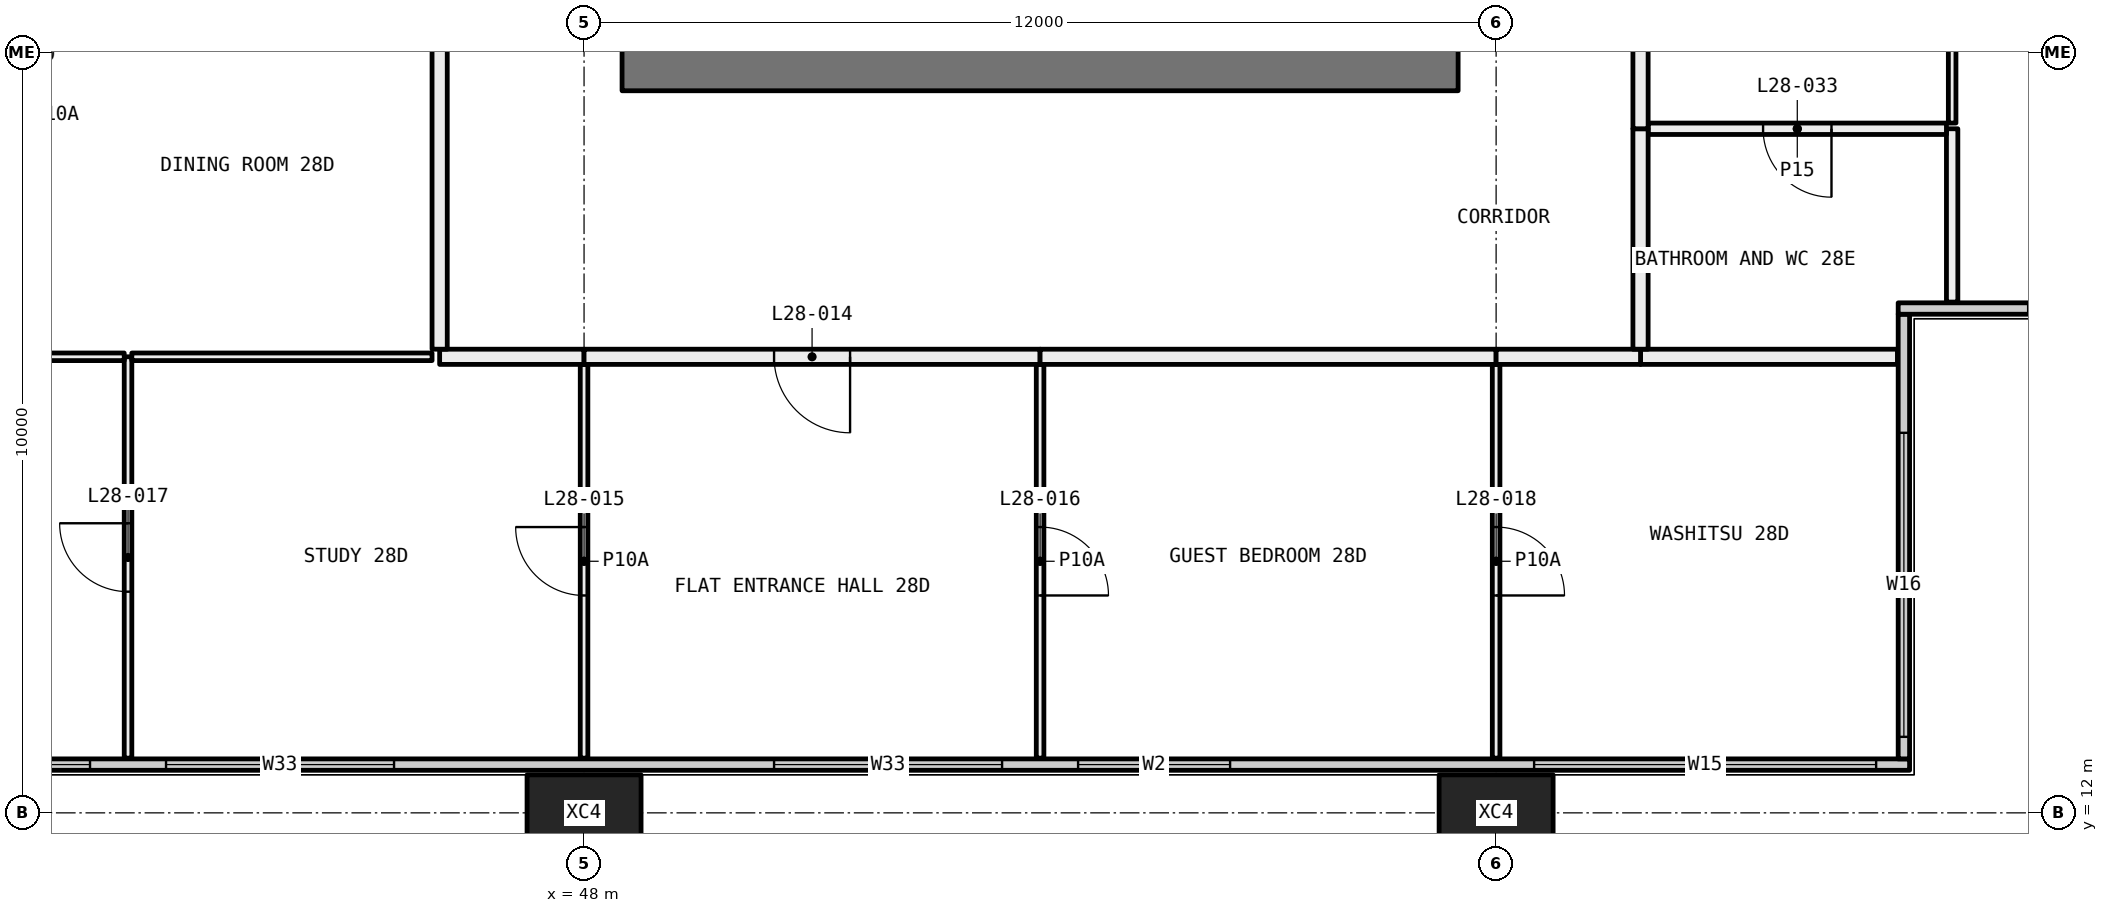
"""IFC4 building model, lengths in metres.
Left out: names, types, materials, properties, quantities, classifications, styles, units other than length and angle.
Written with IfcOpenShell. Run it as: python <this file> out.ifc"""

import sys

from ifc_helpers import new_model, si_unit, direction, frame, frame_2d, origin, origin_2d, place, context, subcontext, project, spatial, rectangle, hollow_rectangle, extrude, element, fill, save


model = new_model("IFC4")
c1 = context("Model", 3, precision=1e-05, world=origin(), true_north=direction((0.0, 1.0)))
c2 = subcontext(c1, "Body", "Model", "MODEL_VIEW")
j1 = project(units=[si_unit("LENGTHUNIT", "METRE"), si_unit("PLANEANGLEUNIT", "RADIAN")], contexts=[c1])
p1 = place(None, origin())
s1 = spatial("IfcSite", under=j1, at=p1, CompositionType="ELEMENT")
p2 = place(p1, origin())
s2 = spatial("IfcBuilding", under=s1, at=p2, CompositionType="ELEMENT")
p3 = place(p2, frame((0.0, 0.0, 110.4)))
s3 = spatial("IfcBuildingStorey", under=s2, at=p3, CompositionType="ELEMENT", Elevation=110.4)
for number, where, z_axis, x_axis in (
    (1, (48.0, 12.0, -0.4), (0.0, 0.0, 1.0), (1.0, 0.0, 0.0)),
    (2, (60.0, 12.0, -0.4), (0.0, 0.0, 1.0), (1.0, 0.0, 0.0)),
):
    element("IfcColumn", number, at=place(p3, frame(where, z_axis=z_axis, x_axis=x_axis)), inside=s3, PredefinedType="COLUMN", context=c2, shape_type="SweptSolid", body=[
        extrude(hollow_rectangle(XDim=1.5, YDim=1.0, WallThickness=0.06, at=origin_2d()), origin(), (0.0, 0.0, 1.0), 3.45),
    ])
p4 = place(p3, frame((6.56, 12.635, 0.0), z_axis=(0.0, 0.0, 1.0), x_axis=(1.0, 0.0, 0.0)))
e3 = element("IfcWall", 3, at=p4, inside=s3, PredefinedType="ELEMENTEDWALL", context=c2, shape_type="SweptSolid", body=[
    extrude(rectangle(XDim=58.88, YDim=0.15, at=frame_2d((29.44, 0.0))), origin(), (0.0, 0.0, 1.0), 3.05),
])
p5 = place(p4, frame((0.44, 0.0, 0.45)))
e4 = element("IfcOpeningElement", 4, at=p5, cuts=e3, PredefinedType="OPENING", context=c2, shape_type="SweptSolid", body=[
    extrude(rectangle(XDim=4.5, YDim=2.55, at=frame_2d((2.25, 1.275))), frame((0.0, 0.085, 0.0), z_axis=(0.0, -1.0, 0.0), x_axis=(1.0, 0.0, 0.0)), (0.0, 0.0, 1.0), 0.17),
])
p6 = place(p4, frame((7.94, 0.0, 0.45)))
e5 = element("IfcOpeningElement", 5, at=p6, cuts=e3, PredefinedType="OPENING", context=c2, shape_type="SweptSolid", body=[
    extrude(rectangle(XDim=3.0, YDim=2.55, at=frame_2d((1.5, 1.275))), frame((0.0, 0.085, 0.0), z_axis=(0.0, -1.0, 0.0), x_axis=(1.0, 0.0, 0.0)), (0.0, 0.0, 1.0), 0.17),
])
p7 = place(p4, frame((11.94, 0.0, 0.45)))
e6 = element("IfcOpeningElement", 6, at=p7, cuts=e3, PredefinedType="OPENING", context=c2, shape_type="SweptSolid", body=[
    extrude(rectangle(XDim=3.0, YDim=2.55, at=frame_2d((1.5, 1.275))), frame((0.0, 0.085, 0.0), z_axis=(0.0, -1.0, 0.0), x_axis=(1.0, 0.0, 0.0)), (0.0, 0.0, 1.0), 0.17),
])
p8 = place(p4, frame((19.94, 0.0, 0.45)))
e7 = element("IfcOpeningElement", 7, at=p8, cuts=e3, PredefinedType="OPENING", context=c2, shape_type="SweptSolid", body=[
    extrude(rectangle(XDim=3.0, YDim=2.55, at=frame_2d((1.5, 1.275))), frame((0.0, 0.085, 0.0), z_axis=(0.0, -1.0, 0.0), x_axis=(1.0, 0.0, 0.0)), (0.0, 0.0, 1.0), 0.17),
])
p9 = place(p4, frame((23.94, 0.0, 0.45)))
e8 = element("IfcOpeningElement", 8, at=p9, cuts=e3, PredefinedType="OPENING", context=c2, shape_type="SweptSolid", body=[
    extrude(rectangle(XDim=2.0, YDim=2.55, at=frame_2d((1.0, 1.275))), frame((0.0, 0.085, 0.0), z_axis=(0.0, -1.0, 0.0), x_axis=(1.0, 0.0, 0.0)), (0.0, 0.0, 1.0), 0.17),
])
p10 = place(p4, frame((31.94, 0.0, 0.45)))
e9 = element("IfcOpeningElement", 9, at=p10, cuts=e3, PredefinedType="OPENING", context=c2, shape_type="SweptSolid", body=[
    extrude(rectangle(XDim=3.0, YDim=2.55, at=frame_2d((1.5, 1.275))), frame((0.0, 0.085, 0.0), z_axis=(0.0, -1.0, 0.0), x_axis=(1.0, 0.0, 0.0)), (0.0, 0.0, 1.0), 0.17),
])
p11 = place(p4, frame((35.94, 0.0, 0.45)))
e10 = element("IfcOpeningElement", 10, at=p11, cuts=e3, PredefinedType="OPENING", context=c2, shape_type="SweptSolid", body=[
    extrude(rectangle(XDim=3.0, YDim=2.55, at=frame_2d((1.5, 1.275))), frame((0.0, 0.085, 0.0), z_axis=(0.0, -1.0, 0.0), x_axis=(1.0, 0.0, 0.0)), (0.0, 0.0, 1.0), 0.17),
])
p12 = place(p4, frame((43.94, 0.0, 0.45)))
e11 = element("IfcOpeningElement", 11, at=p12, cuts=e3, PredefinedType="OPENING", context=c2, shape_type="SweptSolid", body=[
    extrude(rectangle(XDim=3.0, YDim=2.55, at=frame_2d((1.5, 1.275))), frame((0.0, 0.085, 0.0), z_axis=(0.0, -1.0, 0.0), x_axis=(1.0, 0.0, 0.0)), (0.0, 0.0, 1.0), 0.17),
])
p13 = place(p4, frame((47.94, 0.0, 0.45)))
e12 = element("IfcOpeningElement", 12, at=p13, cuts=e3, PredefinedType="OPENING", context=c2, shape_type="SweptSolid", body=[
    extrude(rectangle(XDim=2.0, YDim=2.55, at=frame_2d((1.0, 1.275))), frame((0.0, 0.085, 0.0), z_axis=(0.0, -1.0, 0.0), x_axis=(1.0, 0.0, 0.0)), (0.0, 0.0, 1.0), 0.17),
])
p14 = place(p4, frame((53.94, 0.0, 0.45)))
e13 = element("IfcOpeningElement", 13, at=p14, cuts=e3, PredefinedType="OPENING", context=c2, shape_type="SweptSolid", body=[
    extrude(rectangle(XDim=4.5, YDim=2.55, at=frame_2d((2.25, 1.275))), frame((0.0, 0.085, 0.0), z_axis=(0.0, -1.0, 0.0), x_axis=(1.0, 0.0, 0.0)), (0.0, 0.0, 1.0), 0.17),
])
p15 = place(p3, frame((65.365, 12.71, 0.0), z_axis=(0.0, 0.0, 1.0), x_axis=(0.0, 1.0, 0.0)))
e14 = element("IfcWall", 14, at=p15, inside=s3, PredefinedType="ELEMENTEDWALL", context=c2, shape_type="SweptSolid", body=[
    extrude(rectangle(XDim=5.85, YDim=0.15, at=frame_2d((2.925, 0.0))), origin(), (0.0, 0.0, 1.0), 3.05),
])
p16 = place(p15, frame((0.29, 0.0, 0.45)))
e15 = element("IfcOpeningElement", 15, at=p16, cuts=e14, PredefinedType="OPENING", context=c2, shape_type="SweptSolid", body=[
    extrude(rectangle(XDim=4.0, YDim=2.55, at=frame_2d((2.0, 1.275))), frame((0.0, 0.085, 0.0), z_axis=(0.0, -1.0, 0.0), x_axis=(1.0, 0.0, 0.0)), (0.0, 0.0, 1.0), 0.17),
])
p17 = place(p3, frame((65.29, 18.635, 0.0), z_axis=(0.0, 0.0, 1.0), x_axis=(1.0, 0.0, 0.0)))
e16 = element("IfcWall", 16, at=p17, inside=s3, PredefinedType="ELEMENTEDWALL", context=c2, shape_type="SweptSolid", body=[
    extrude(rectangle(XDim=6.15, YDim=0.15, at=frame_2d((3.075, 0.0))), origin(), (0.0, 0.0, 1.0), 3.05),
])
p18 = place(p17, frame((1.71, 0.0, 0.45)))
e17 = element("IfcOpeningElement", 17, at=p18, cuts=e16, PredefinedType="OPENING", context=c2, shape_type="SweptSolid", body=[
    extrude(rectangle(XDim=4.0, YDim=2.55, at=frame_2d((2.0, 1.275))), frame((0.0, 0.085, 0.0), z_axis=(0.0, -1.0, 0.0), x_axis=(1.0, 0.0, 0.0)), (0.0, 0.0, 1.0), 0.17),
])
p19 = place(p3, frame((42.0, 12.72, 0.0), z_axis=(0.0, 0.0, 1.0), x_axis=(0.0, 1.0, 0.0)))
e18 = element("IfcWall", 18, at=p19, inside=s3, PredefinedType="PARTITIONING", context=c2, shape_type="SweptSolid", body=[
    extrude(rectangle(XDim=5.28, YDim=0.1, at=frame_2d((2.64, 0.0))), origin(), (0.0, 0.0, 1.0), 3.05),
])
p20 = place(p19, frame((2.19, 0.0, 0.0)))
e19 = element("IfcOpeningElement", 19, at=p20, cuts=e18, PredefinedType="OPENING", context=c2, shape_type="SweptSolid", body=[
    extrude(rectangle(XDim=0.9, YDim=2.1, at=frame_2d((0.45, 1.05))), frame((0.0, 0.06, 0.0), z_axis=(0.0, -1.0, 0.0), x_axis=(1.0, 0.0, 0.0)), (0.0, 0.0, 1.0), 0.12),
])
p21 = place(p3, frame((41.95, 18.0, 0.0), z_axis=(0.0, 0.0, 1.0), x_axis=(-1.0, 0.0, 0.0)))
e20 = element("IfcWall", 20, at=p21, inside=s3, PredefinedType="PARTITIONING", context=c2, shape_type="SweptSolid", body=[
    extrude(rectangle(XDim=1.45, YDim=0.1, at=frame_2d((0.725, 0.0))), origin(), (0.0, 0.0, 1.0), 3.05),
])
p22 = place(p3, frame((48.0, 12.72, 0.0), z_axis=(0.0, 0.0, 1.0), x_axis=(0.0, 1.0, 0.0)))
e21 = element("IfcWall", 21, at=p22, inside=s3, PredefinedType="PARTITIONING", context=c2, shape_type="SweptSolid", body=[
    extrude(rectangle(XDim=5.18, YDim=0.1, at=frame_2d((2.59, 0.0))), origin(), (0.0, 0.0, 1.0), 3.05),
])
p23 = place(p22, frame((2.14, 0.0, 0.0)))
e22 = element("IfcOpeningElement", 22, at=p23, cuts=e21, PredefinedType="OPENING", context=c2, shape_type="SweptSolid", body=[
    extrude(rectangle(XDim=0.9, YDim=2.1, at=frame_2d((0.45, 1.05))), frame((0.0, 0.06, 0.0), z_axis=(0.0, -1.0, 0.0), x_axis=(1.0, 0.0, 0.0)), (0.0, 0.0, 1.0), 0.12),
])
p24 = place(p3, frame((46.0, 18.0, 0.0), z_axis=(0.0, 0.0, 1.0), x_axis=(-1.0, 0.0, 0.0)))
e23 = element("IfcWall", 23, at=p24, inside=s3, PredefinedType="PARTITIONING", context=c2, shape_type="SweptSolid", body=[
    extrude(rectangle(XDim=3.95, YDim=0.1, at=frame_2d((1.975, 0.0))), origin(), (0.0, 0.0, 1.0), 3.05),
])
p25 = place(p3, frame((48.0, 18.0, 0.0), z_axis=(0.0, 0.0, 1.0), x_axis=(-1.0, 0.0, 0.0)))
e24 = element("IfcWall", 24, at=p25, inside=s3, PredefinedType="PARTITIONING", context=c2, shape_type="SweptSolid", body=[
    extrude(rectangle(XDim=1.9, YDim=0.2, at=frame_2d((0.95, 0.0))), origin(), (0.0, 0.0, 1.0), 3.05),
])
p26 = place(p3, frame((54.0, 12.72, 0.0), z_axis=(0.0, 0.0, 1.0), x_axis=(0.0, 1.0, 0.0)))
e25 = element("IfcWall", 25, at=p26, inside=s3, PredefinedType="PARTITIONING", context=c2, shape_type="SweptSolid", body=[
    extrude(rectangle(XDim=5.18, YDim=0.1, at=frame_2d((2.59, 0.0))), origin(), (0.0, 0.0, 1.0), 3.05),
])
p27 = place(p26, frame((2.14, 0.0, 0.0)))
e26 = element("IfcOpeningElement", 26, at=p27, cuts=e25, PredefinedType="OPENING", context=c2, shape_type="SweptSolid", body=[
    extrude(rectangle(XDim=0.9, YDim=2.1, at=frame_2d((0.45, 1.05))), frame((0.0, 0.06, 0.0), z_axis=(0.0, -1.0, 0.0), x_axis=(1.0, 0.0, 0.0)), (0.0, 0.0, 1.0), 0.12),
])
p28 = place(p3, frame((54.0, 18.0, 0.0), z_axis=(0.0, 0.0, 1.0), x_axis=(-1.0, 0.0, 0.0)))
e27 = element("IfcWall", 27, at=p28, inside=s3, PredefinedType="PARTITIONING", context=c2, shape_type="SweptSolid", body=[
    extrude(rectangle(XDim=6.0, YDim=0.2, at=frame_2d((3.0, 0.0))), origin(), (0.0, 0.0, 1.0), 3.05),
])
p29 = place(p28, frame((2.5, 0.0, 0.0)))
e28 = element("IfcOpeningElement", 28, at=p29, cuts=e27, PredefinedType="OPENING", context=c2, shape_type="SweptSolid", body=[
    extrude(rectangle(XDim=1.0, YDim=2.1, at=frame_2d((0.5, 1.05))), frame((0.0, 0.11, 0.0), z_axis=(0.0, -1.0, 0.0), x_axis=(1.0, 0.0, 0.0)), (0.0, 0.0, 1.0), 0.22),
])
p30 = place(p3, frame((60.0, 12.72, 0.0), z_axis=(0.0, 0.0, 1.0), x_axis=(0.0, 1.0, 0.0)))
e29 = element("IfcWall", 29, at=p30, inside=s3, PredefinedType="PARTITIONING", context=c2, shape_type="SweptSolid", body=[
    extrude(rectangle(XDim=5.18, YDim=0.1, at=frame_2d((2.59, 0.0))), origin(), (0.0, 0.0, 1.0), 3.05),
])
p31 = place(p30, frame((2.14, 0.0, 0.0)))
e30 = element("IfcOpeningElement", 30, at=p31, cuts=e29, PredefinedType="OPENING", context=c2, shape_type="SweptSolid", body=[
    extrude(rectangle(XDim=0.9, YDim=2.1, at=frame_2d((0.45, 1.05))), frame((0.0, 0.06, 0.0), z_axis=(0.0, -1.0, 0.0), x_axis=(1.0, 0.0, 0.0)), (0.0, 0.0, 1.0), 0.12),
])
p32 = place(p3, frame((60.0, 18.0, 0.0), z_axis=(0.0, 0.0, 1.0), x_axis=(-1.0, 0.0, 0.0)))
e31 = element("IfcWall", 31, at=p32, inside=s3, PredefinedType="PARTITIONING", context=c2, shape_type="SweptSolid", body=[
    extrude(rectangle(XDim=6.0, YDim=0.2, at=frame_2d((3.0, 0.0))), origin(), (0.0, 0.0, 1.0), 3.05),
])
p33 = place(p3, frame((65.28, 18.0, 0.0), z_axis=(0.0, 0.0, 1.0), x_axis=(-1.0, 0.0, 0.0)))
e32 = element("IfcWall", 32, at=p33, inside=s3, PredefinedType="PARTITIONING", context=c2, shape_type="SweptSolid", body=[
    extrude(rectangle(XDim=3.38, YDim=0.2, at=frame_2d((1.69, 0.0))), origin(), (0.0, 0.0, 1.0), 3.05),
])
p34 = place(p3, frame((61.9, 18.0, 0.0), z_axis=(0.0, 0.0, 1.0), x_axis=(-1.0, 0.0, 0.0)))
e33 = element("IfcWall", 33, at=p34, inside=s3, PredefinedType="PARTITIONING", context=c2, shape_type="SweptSolid", body=[
    extrude(rectangle(XDim=1.9, YDim=0.2, at=frame_2d((0.95, 0.0))), origin(), (0.0, 0.0, 1.0), 3.05),
])
p35 = place(p3, frame((46.1, 18.1, 0.0), z_axis=(0.0, 0.0, 1.0), x_axis=(0.0, 1.0, 0.0)))
e34 = element("IfcWall", 34, at=p35, inside=s3, PredefinedType="PARTITIONING", context=c2, shape_type="SweptSolid", body=[
    extrude(rectangle(XDim=6.2, YDim=0.2, at=frame_2d((3.1, 0.0))), origin(), (0.0, 0.0, 1.0), 2.45),
])
p36 = place(p3, frame((66.0, 21.0, 0.0), z_axis=(0.0, 0.0, 1.0), x_axis=(0.0, -1.0, 0.0)))
e35 = element("IfcWall", 35, at=p36, inside=s3, PredefinedType="PARTITIONING", context=c2, shape_type="SweptSolid", body=[
    extrude(rectangle(XDim=2.28, YDim=0.15, at=frame_2d((1.14, 0.0))), origin(), (0.0, 0.0, 1.0), 3.05),
])
p37 = place(p3, frame((66.0, 23.95, 0.0), z_axis=(0.0, 0.0, 1.0), x_axis=(0.0, -1.0, 0.0)))
e36 = element("IfcWall", 36, at=p37, inside=s3, PredefinedType="PARTITIONING", context=c2, shape_type="SweptSolid", body=[
    extrude(rectangle(XDim=2.875, YDim=0.1, at=frame_2d((1.438, 0.0))), origin(), (0.0, 0.0, 1.0), 2.45),
])
p38 = place(p3, frame((65.925, 21.0, 0.0), z_axis=(0.0, 0.0, 1.0), x_axis=(-1.0, 0.0, 0.0)))
e37 = element("IfcWall", 37, at=p38, inside=s3, PredefinedType="PARTITIONING", context=c2, shape_type="SweptSolid", body=[
    extrude(rectangle(XDim=3.925, YDim=0.15, at=frame_2d((1.962, 0.0))), origin(), (0.0, 0.0, 1.0), 3.05),
])
p39 = place(p38, frame((1.512, 0.0, 0.0)))
e38 = element("IfcOpeningElement", 38, at=p39, cuts=e37, PredefinedType="OPENING", context=c2, shape_type="SweptSolid", body=[
    extrude(rectangle(XDim=0.9, YDim=2.1, at=frame_2d((0.45, 1.05))), frame((0.0, 0.085, 0.0), z_axis=(0.0, -1.0, 0.0), x_axis=(1.0, 0.0, 0.0)), (0.0, 0.0, 1.0), 0.17),
])
for number, where, z_axis, x_axis in (
    (39, (61.9, 21.0, 0.0), (0.0, 0.0, 1.0), (0.0, -1.0, 0.0)),
    (40, (61.9, 23.9, 0.0), (0.0, 0.0, 1.0), (0.0, -1.0, 0.0)),
):
    element("IfcWall", number, at=place(p3, frame(where, z_axis=z_axis, x_axis=x_axis)), inside=s3, PredefinedType="PARTITIONING", context=c2, shape_type="SweptSolid", body=[
        extrude(rectangle(XDim=2.9, YDim=0.2, at=frame_2d((1.45, 0.0))), origin(), (0.0, 0.0, 1.0), 3.05),
    ])
p40 = place(p3, frame((59.5, 21.825, 0.0), z_axis=(0.0, 0.0, 1.0), x_axis=(-1.0, 0.0, 0.0)))
e41 = element("IfcWall", 41, at=p40, inside=s3, PredefinedType="SHEAR", context=c2, shape_type="SweptSolid", body=[
    extrude(rectangle(XDim=11.0, YDim=0.65, at=frame_2d((5.5, 0.0))), origin(), (0.0, 0.0, 1.0), 3.05),
])
p41 = place(p10, origin())
e42 = element("IfcWindow", 42, at=p41, inside=s3, PartitioningType="SINGLE_PANEL", PredefinedType="WINDOW", context=c2, shape_type="SweptSolid", body=[
    extrude(rectangle(XDim=3.0, YDim=2.55, at=frame_2d((1.5, 1.275))), frame((0.0, 0.03, 0.0), z_axis=(0.0, -1.0, 0.0), x_axis=(1.0, 0.0, 0.0)), (0.0, 0.0, 1.0), 0.06),
])
fill(e9, e42)
p42 = place(p11, origin())
e43 = element("IfcWindow", 43, at=p42, inside=s3, PartitioningType="SINGLE_PANEL", PredefinedType="WINDOW", context=c2, shape_type="SweptSolid", body=[
    extrude(rectangle(XDim=3.0, YDim=2.55, at=frame_2d((1.5, 1.275))), frame((0.0, 0.03, 0.0), z_axis=(0.0, -1.0, 0.0), x_axis=(1.0, 0.0, 0.0)), (0.0, 0.0, 1.0), 0.06),
])
fill(e10, e43)
p43 = place(p12, origin())
e44 = element("IfcWindow", 44, at=p43, inside=s3, PartitioningType="SINGLE_PANEL", PredefinedType="WINDOW", context=c2, shape_type="SweptSolid", body=[
    extrude(rectangle(XDim=3.0, YDim=2.55, at=frame_2d((1.5, 1.275))), frame((0.0, 0.03, 0.0), z_axis=(0.0, -1.0, 0.0), x_axis=(1.0, 0.0, 0.0)), (0.0, 0.0, 1.0), 0.06),
])
fill(e11, e44)
p44 = place(p13, origin())
e45 = element("IfcWindow", 45, at=p44, inside=s3, PartitioningType="SINGLE_PANEL", PredefinedType="WINDOW", context=c2, shape_type="SweptSolid", body=[
    extrude(rectangle(XDim=2.0, YDim=2.55, at=frame_2d((1.0, 1.275))), frame((0.0, 0.03, 0.0), z_axis=(0.0, -1.0, 0.0), x_axis=(1.0, 0.0, 0.0)), (0.0, 0.0, 1.0), 0.06),
])
fill(e12, e45)
p45 = place(p14, origin())
e46 = element("IfcWindow", 46, at=p45, inside=s3, PartitioningType="SINGLE_PANEL", PredefinedType="WINDOW", context=c2, shape_type="SweptSolid", body=[
    extrude(rectangle(XDim=4.5, YDim=2.55, at=frame_2d((2.25, 1.275))), frame((0.0, 0.03, 0.0), z_axis=(0.0, -1.0, 0.0), x_axis=(1.0, 0.0, 0.0)), (0.0, 0.0, 1.0), 0.06),
])
fill(e13, e46)
p46 = place(p16, origin())
e47 = element("IfcWindow", 47, at=p46, inside=s3, PartitioningType="SINGLE_PANEL", PredefinedType="WINDOW", context=c2, shape_type="SweptSolid", body=[
    extrude(rectangle(XDim=4.0, YDim=2.55, at=frame_2d((2.0, 1.275))), frame((0.0, 0.03, 0.0), z_axis=(0.0, -1.0, 0.0), x_axis=(1.0, 0.0, 0.0)), (0.0, 0.0, 1.0), 0.06),
])
fill(e15, e47)
p47 = place(p29, origin())
e48 = element("IfcDoor", 48, at=p47, inside=s3, OperationType="SINGLE_SWING_RIGHT", PredefinedType="DOOR", context=c2, shape_type="SweptSolid", body=[
    extrude(rectangle(XDim=1.0, YDim=2.1, at=frame_2d((0.5, 1.05))), frame((0.0, 0.025, 0.0), z_axis=(0.0, -1.0, 0.0), x_axis=(1.0, 0.0, 0.0)), (0.0, 0.0, 1.0), 0.05),
])
fill(e28, e48)
p48 = place(p23, origin())
e49 = element("IfcDoor", 49, at=p48, inside=s3, OperationType="SINGLE_SWING_LEFT", PredefinedType="DOOR", context=c2, shape_type="SweptSolid", body=[
    extrude(rectangle(XDim=0.9, YDim=2.1, at=frame_2d((0.45, 1.05))), frame((0.0, 0.025, 0.0), z_axis=(0.0, -1.0, 0.0), x_axis=(1.0, 0.0, 0.0)), (0.0, 0.0, 1.0), 0.05),
])
fill(e22, e49)
p49 = place(p27, frame((0.9, 0.0, 0.0), x_axis=(-1.0, 0.0, 0.0)))
e50 = element("IfcDoor", 50, at=p49, inside=s3, OperationType="SINGLE_SWING_LEFT", PredefinedType="DOOR", context=c2, shape_type="SweptSolid", body=[
    extrude(rectangle(XDim=0.9, YDim=2.1, at=frame_2d((0.45, 1.05))), frame((0.0, 0.025, 0.0), z_axis=(0.0, -1.0, 0.0), x_axis=(1.0, 0.0, 0.0)), (0.0, 0.0, 1.0), 0.05),
])
fill(e26, e50)
p50 = place(p20, origin())
e51 = element("IfcDoor", 51, at=p50, inside=s3, OperationType="SINGLE_SWING_LEFT", PredefinedType="DOOR", context=c2, shape_type="SweptSolid", body=[
    extrude(rectangle(XDim=0.9, YDim=2.1, at=frame_2d((0.45, 1.05))), frame((0.0, 0.025, 0.0), z_axis=(0.0, -1.0, 0.0), x_axis=(1.0, 0.0, 0.0)), (0.0, 0.0, 1.0), 0.05),
])
fill(e19, e51)
p51 = place(p31, frame((0.9, 0.0, 0.0), x_axis=(-1.0, 0.0, 0.0)))
e52 = element("IfcDoor", 52, at=p51, inside=s3, OperationType="SINGLE_SWING_LEFT", PredefinedType="DOOR", context=c2, shape_type="SweptSolid", body=[
    extrude(rectangle(XDim=0.9, YDim=2.1, at=frame_2d((0.45, 1.05))), frame((0.0, 0.025, 0.0), z_axis=(0.0, -1.0, 0.0), x_axis=(1.0, 0.0, 0.0)), (0.0, 0.0, 1.0), 0.05),
])
fill(e30, e52)
p52 = place(p39, origin())
e53 = element("IfcDoor", 53, at=p52, inside=s3, OperationType="SINGLE_SWING_RIGHT", PredefinedType="DOOR", context=c2, shape_type="SweptSolid", body=[
    extrude(rectangle(XDim=0.9, YDim=2.1, at=frame_2d((0.45, 1.05))), frame((0.0, 0.025, 0.0), z_axis=(0.0, -1.0, 0.0), x_axis=(1.0, 0.0, 0.0)), (0.0, 0.0, 1.0), 0.05),
])
fill(e38, e53)
save(model, sys.argv[1])
